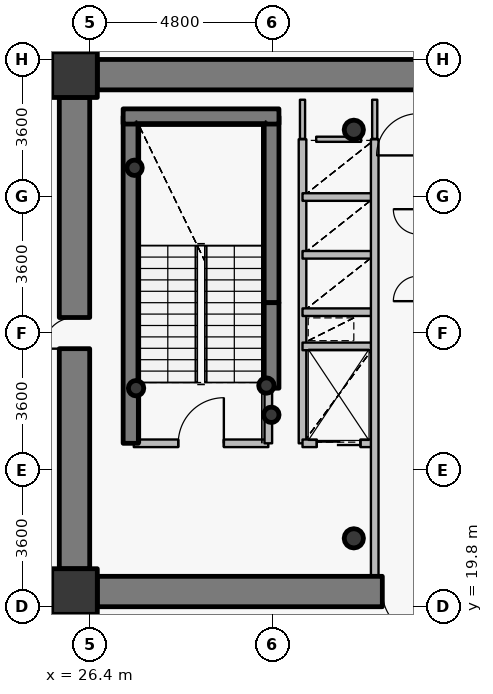
"""IFC4 building model, lengths in metres.
Left out: names, types, materials, properties, quantities, classifications, styles, units other than length and angle.
Written with IfcOpenShell. Run it as: python <this file> out.ifc"""

import sys

from ifc_helpers import new_model, si_unit, direction, frame, frame_2d, origin, origin_2d, place, context, subcontext, project, spatial, rectangle, hollow_circle, extrude, source, transform, mapped, element, fill, save


model = new_model("IFC4")
c1 = context("Model", 3, precision=1e-05, world=origin(), true_north=direction((0.0, 1.0)))
c2 = subcontext(c1, "Body", "Model", "MODEL_VIEW")
j1 = project(units=[si_unit("LENGTHUNIT", "METRE"), si_unit("PLANEANGLEUNIT", "RADIAN")], contexts=[c1])
p1 = place(None, origin())
s1 = spatial("IfcSite", under=j1, at=p1, CompositionType="ELEMENT")
p2 = place(p1, origin())
s2 = spatial("IfcBuilding", under=s1, at=p2, CompositionType="ELEMENT")
p3 = place(p2, frame((0.0, 0.0, 112.2)))
s3 = spatial("IfcBuildingStorey", under=s2, at=p3, CompositionType="ELEMENT", Elevation=112.2)
for number, where, z_axis, x_axis in (
    (1, (26.0, 20.2, 0.0), (0.0, 0.0, 1.0), (1.0, 0.0, 0.0)),
    (2, (26.0, 33.8, 0.0), (0.0, 0.0, 1.0), (1.0, 0.0, 0.0)),
):
    element("IfcColumn", number, at=place(p3, frame(where, z_axis=z_axis, x_axis=x_axis)), inside=s3, PredefinedType="COLUMN", context=c2, shape_type="SweptSolid", body=[
        extrude(rectangle(XDim=1.2, YDim=1.2, at=origin_2d()), origin(), (0.0, 0.0, 1.0), 3.75),
    ])
for number, where, z_axis, x_axis in (
    (3, (33.35, 21.6, 0.0), (0.0, 0.0, 1.0), (1.0, 0.0, 0.0)),
    (4, (33.35, 32.35, 0.0), (0.0, 0.0, 1.0), (1.0, 0.0, 0.0)),
):
    element("IfcColumn", number, at=place(p3, frame(where, z_axis=z_axis, x_axis=x_axis)), inside=s3, PredefinedType="COLUMN", context=c2, shape_type="SweptSolid", body=[
        extrude(hollow_circle(Radius=0.254, WallThickness=0.02, at=origin_2d()), origin(), (0.0, 0.0, 1.0), 3.75),
    ])
p4 = place(p3, frame((27.48, 24.1, 0.0), z_axis=(0.0, 0.0, 1.0), x_axis=(0.0, 1.0, 0.0)))
e5 = element("IfcWall", 5, at=p4, inside=s3, PredefinedType="SHEAR", context=c2, shape_type="SweptSolid", body=[
    extrude(rectangle(XDim=8.6, YDim=0.4, at=frame_2d((4.3, 0.0))), origin(), (0.0, 0.0, 1.0), 3.75),
])
p5 = place(p3, frame((31.18, 27.8, 0.0), z_axis=(0.0, 0.0, 1.0), x_axis=(0.0, 1.0, 0.0)))
e6 = element("IfcWall", 6, at=p5, inside=s3, PredefinedType="SHEAR", context=c2, shape_type="SweptSolid", body=[
    extrude(rectangle(XDim=4.9, YDim=0.4, at=frame_2d((2.45, 0.0))), origin(), (0.0, 0.0, 1.0), 3.75),
])
p6 = place(p3, frame((27.28, 32.7, 0.0), z_axis=(0.0, 0.0, 1.0), x_axis=(1.0, 0.0, 0.0)))
e7 = element("IfcWall", 7, at=p6, inside=s3, PredefinedType="SHEAR", context=c2, shape_type="SweptSolid", body=[
    extrude(rectangle(XDim=4.1, YDim=0.4, at=frame_2d((2.05, 0.0))), origin(), (0.0, 0.0, 1.0), 3.75),
])
for number, where, z_axis, x_axis in (
    (8, (27.58, 31.35, 0.0), (0.0, 0.0, 1.0), (1.0, 0.0, 0.0)),
    (9, (31.05, 25.62, 0.0), (0.0, 0.0, 1.0), (1.0, 0.0, 0.0)),
    (10, (31.18, 24.85, 0.0), (0.0, 0.0, 1.0), (1.0, 0.0, 0.0)),
    (11, (27.62, 25.55, 0.0), (0.0, 0.0, 1.0), (1.0, 0.0, 0.0)),
):
    element("IfcColumn", number, at=place(p3, frame(where, z_axis=z_axis, x_axis=x_axis)), inside=s3, PredefinedType="COLUMN", context=c2, shape_type="SweptSolid", body=[
        extrude(hollow_circle(Radius=0.203, WallThickness=0.016, at=origin_2d()), origin(), (0.0, 0.0, 1.0), 3.75),
    ])
p7 = place(p3, frame((26.6, 33.8, 0.0), z_axis=(0.0, 0.0, 1.0), x_axis=(1.0, 0.0, 0.0)))
e12 = element("IfcWall", 12, at=p7, inside=s3, PredefinedType="SHEAR", context=c2, shape_type="SweptSolid", body=[
    extrude(rectangle(XDim=18.8, YDim=0.8, at=frame_2d((9.4, 0.0))), origin(), (0.0, 0.0, 1.0), 2.95),
])
p8 = place(p3, frame((45.4, 20.2, 0.0), z_axis=(0.0, 0.0, 1.0), x_axis=(-1.0, 0.0, 0.0)))
e13 = element("IfcWall", 13, at=p8, inside=s3, PredefinedType="SHEAR", context=c2, shape_type="SweptSolid", body=[
    extrude(rectangle(XDim=18.8, YDim=0.8, at=frame_2d((9.4, 0.0))), origin(), (0.0, 0.0, 1.0), 2.95),
])
p9 = place(p8, frame((10.15, 0.0, 0.0)))
e14 = element("IfcOpeningElement", 14, at=p9, cuts=e13, PredefinedType="OPENING", context=c2, shape_type="SweptSolid", body=[
    extrude(rectangle(XDim=1.15, YDim=2.15, at=origin_2d()), frame((0.575, 0.41, 1.075), z_axis=(0.0, -1.0, 0.0), x_axis=(1.0, 0.0, 0.0)), (0.0, 0.0, 1.0), 0.82),
])
p10 = place(p3, frame((26.0, 20.8, 0.0), z_axis=(0.0, 0.0, 1.0), x_axis=(0.0, 1.0, 0.0)))
e15 = element("IfcWall", 15, at=p10, inside=s3, PredefinedType="SHEAR", context=c2, shape_type="SweptSolid", body=[
    extrude(rectangle(XDim=12.4, YDim=0.8, at=frame_2d((6.2, 0.0))), origin(), (0.0, 0.0, 1.0), 2.95),
])
p11 = place(p10, frame((5.79, 0.0, 0.0)))
e16 = element("IfcOpeningElement", 16, at=p11, cuts=e15, PredefinedType="OPENING", context=c2, shape_type="SweptSolid", body=[
    extrude(rectangle(XDim=0.82, YDim=2.1, at=origin_2d()), frame((0.41, 0.41, 1.05), z_axis=(0.0, -1.0, 0.0), x_axis=(1.0, 0.0, 0.0)), (0.0, 0.0, 1.0), 0.82),
])
p12 = place(p3, frame((31.18, 25.55, 0.0), z_axis=(0.0, 0.0, 1.0), x_axis=(0.0, 1.0, 0.0)))
e17 = element("IfcWall", 17, at=p12, inside=s3, PredefinedType="SHEAR", context=c2, shape_type="SweptSolid", body=[
    extrude(rectangle(XDim=2.25, YDim=0.4, at=frame_2d((1.125, 0.0))), origin(), (0.0, 0.0, 1.0), 3.1),
])
p13 = place(p3, frame((27.56, 24.1, 0.0), z_axis=(0.0, 0.0, 1.0), x_axis=(1.0, 0.0, 0.0)))
e18 = element("IfcWall", 18, at=p13, inside=s3, PredefinedType="PARTITIONING", context=c2, shape_type="SweptSolid", body=[
    extrude(rectangle(XDim=3.54, YDim=0.2, at=frame_2d((1.77, 0.0))), origin(), (0.0, 0.0, 1.0), 3.5),
])
p14 = place(p13, frame((1.17, 0.0, 0.0)))
e19 = element("IfcOpeningElement", 19, at=p14, cuts=e18, PredefinedType="OPENING", context=c2, shape_type="SweptSolid", body=[
    extrude(rectangle(XDim=1.2, YDim=2.15, at=origin_2d()), frame((0.6, 0.11, 1.075), z_axis=(0.0, -1.0, 0.0), x_axis=(1.0, 0.0, 0.0)), (0.0, 0.0, 1.0), 0.22),
])
p15 = place(p3, frame((31.1, 24.1, 0.0), z_axis=(0.0, 0.0, 1.0), x_axis=(0.0, 1.0, 0.0)))
e20 = element("IfcWall", 20, at=p15, inside=s3, PredefinedType="PARTITIONING", context=c2, shape_type="SweptSolid", body=[
    extrude(rectangle(XDim=1.44, YDim=0.2, at=frame_2d((0.72, 0.0))), origin(), (0.0, 0.0, 1.0), 3.5),
])
p16 = place(p3, frame((32.0, 24.1, 0.0), z_axis=(0.0, 0.0, 1.0), x_axis=(0.0, 1.0, 0.0)))
e21 = element("IfcWall", 21, at=p16, inside=s3, PredefinedType="PARTITIONING", context=c2, shape_type="SweptSolid", body=[
    extrude(rectangle(XDim=8.0, YDim=0.2, at=frame_2d((4.0, 0.0))), origin(), (0.0, 0.0, 1.0), 3.5),
])
p17 = place(p3, frame((32.0, 24.1, 0.0), z_axis=(0.0, 0.0, 1.0), x_axis=(1.0, 0.0, 0.0)))
e22 = element("IfcWall", 22, at=p17, inside=s3, PredefinedType="PARTITIONING", context=c2, shape_type="SweptSolid", body=[
    extrude(rectangle(XDim=1.9, YDim=0.2, at=frame_2d((0.95, 0.0))), origin(), (0.0, 0.0, 1.0), 3.085),
])
p18 = place(p17, frame((0.375, 0.0, 0.0)))
e23 = element("IfcOpeningElement", 23, at=p18, cuts=e22, PredefinedType="OPENING", context=c2, shape_type="SweptSolid", body=[
    extrude(rectangle(XDim=1.15, YDim=2.15, at=origin_2d()), frame((0.575, 0.11, 1.075), z_axis=(0.0, -1.0, 0.0), x_axis=(1.0, 0.0, 0.0)), (0.0, 0.0, 1.0), 0.22),
])
for number, where, z_axis, x_axis in (
    (24, (32.0, 26.65, 0.0), (0.0, 0.0, 1.0), (1.0, 0.0, 0.0)),
    (25, (32.0, 27.55, 0.0), (0.0, 0.0, 1.0), (1.0, 0.0, 0.0)),
    (26, (32.0, 29.06, 0.0), (0.0, 0.0, 1.0), (1.0, 0.0, 0.0)),
    (27, (32.0, 30.58, 0.0), (0.0, 0.0, 1.0), (1.0, 0.0, 0.0)),
):
    element("IfcWall", number, at=place(p3, frame(where, z_axis=z_axis, x_axis=x_axis)), inside=s3, PredefinedType="PARTITIONING", context=c2, shape_type="SweptSolid", body=[
        extrude(rectangle(XDim=1.9, YDim=0.2, at=frame_2d((0.95, 0.0))), origin(), (0.0, 0.0, 1.0), 3.085),
    ])
p19 = place(p3, frame((33.9, 20.6, 0.0), z_axis=(0.0, 0.0, 1.0), x_axis=(0.0, 1.0, 0.0)))
e28 = element("IfcWall", 28, at=p19, inside=s3, PredefinedType="PARTITIONING", context=c2, shape_type="SweptSolid", body=[
    extrude(rectangle(XDim=11.5, YDim=0.2, at=frame_2d((5.75, 0.0))), origin(), (0.0, 0.0, 1.0), 3.085),
])
p20 = place(p3, frame((32.36, 32.1, 0.0), z_axis=(0.0, 0.0, 1.0), x_axis=(1.0, 0.0, 0.0)))
e29 = element("IfcWall", 29, at=p20, inside=s3, PredefinedType="PARTITIONING", context=c2, shape_type="SweptSolid", body=[
    extrude(rectangle(XDim=1.18, YDim=0.135, at=frame_2d((0.59, 0.0))), origin(), (0.0, 0.0, 1.0), 3.085),
])
p21 = place(p3, frame((32.0, 33.14, 0.0), z_axis=(0.0, 0.0, 1.0), x_axis=(0.0, -1.0, 0.0)))
e30 = element("IfcWall", 30, at=p21, inside=s3, PredefinedType="PARTITIONING", context=c2, shape_type="SweptSolid", body=[
    extrude(rectangle(XDim=1.03, YDim=0.135, at=frame_2d((0.515, 0.0))), origin(), (0.0, 0.0, 1.0), 3.035),
])
p22 = place(p3, frame((33.9, 32.11, 0.0), z_axis=(0.0, 0.0, 1.0), x_axis=(0.0, 1.0, 0.0)))
e31 = element("IfcWall", 31, at=p22, inside=s3, PredefinedType="PARTITIONING", context=c2, shape_type="SweptSolid", body=[
    extrude(rectangle(XDim=1.03, YDim=0.135, at=frame_2d((0.515, 0.0))), origin(), (0.0, 0.0, 1.0), 3.085),
])
p23 = place(p3, frame((26.59, 34.2, 0.0), z_axis=(0.0, 0.0, 1.0), x_axis=(-1.0, 0.0, 0.0)))
e32 = element("IfcWall", 32, at=p23, inside=s3, PredefinedType="PARTITIONING", context=c2, shape_type="SweptSolid", body=[
    extrude(rectangle(XDim=0.99, YDim=0.135, at=frame_2d((0.495, 0.0))), origin(), (0.0, 0.0, 1.0), 2.935),
])
p24 = place(p3, frame((25.6, 33.893, 0.0), z_axis=(0.0, 0.0, 1.0), x_axis=(0.0, -1.0, 0.0)))
e33 = element("IfcWall", 33, at=p24, inside=s3, PredefinedType="PARTITIONING", context=c2, shape_type="SweptSolid", body=[
    extrude(rectangle(XDim=0.683, YDim=0.135, at=frame_2d((0.341, 0.0))), origin(), (0.0, 0.0, 1.0), 3.5),
])
p25 = place(p3, frame((25.6, 20.79, 0.0), z_axis=(0.0, 0.0, 1.0), x_axis=(0.0, -1.0, 0.0)))
e34 = element("IfcWall", 34, at=p25, inside=s3, PredefinedType="PARTITIONING", context=c2, shape_type="SweptSolid", body=[
    extrude(rectangle(XDim=0.99, YDim=0.135, at=frame_2d((0.495, 0.0))), origin(), (0.0, 0.0, 1.0), 3.5),
])
p26 = place(p3, frame((25.907, 19.8, 0.0), z_axis=(0.0, 0.0, 1.0), x_axis=(1.0, 0.0, 0.0)))
e35 = element("IfcWall", 35, at=p26, inside=s3, PredefinedType="PARTITIONING", context=c2, shape_type="SweptSolid", body=[
    extrude(rectangle(XDim=0.683, YDim=0.135, at=frame_2d((0.341, 0.0))), origin(), (0.0, 0.0, 1.0), 2.935),
])
m1 = source(origin(), c2, "Body", "SweptSolid", [
    extrude(rectangle(XDim=0.82, YDim=2.1, at=origin_2d()), frame((0.41, 0.025, 1.05), z_axis=(0.0, -1.0, 0.0), x_axis=(1.0, 0.0, 0.0)), (0.0, 0.0, 1.0), 0.05),
])
p27 = place(p11, origin())
e36 = element("IfcDoor", 36, at=p27, inside=s3, OperationType="SINGLE_SWING_LEFT", PredefinedType="DOOR", context=c2, shape_type="MappedRepresentation", body=[
    mapped(m1, transform((0.0, 0.0, 0.0), x_axis=(1.0, 0.0, 0.0), y_axis=(0.0, 1.0, 0.0), z_axis=(0.0, 0.0, 1.0), scale=1.0)),
])
fill(e16, e36)
m2 = source(origin(), c2, "Body", "SweptSolid", [
    extrude(rectangle(XDim=1.15, YDim=2.15, at=origin_2d()), frame((0.575, 0.025, 1.075), z_axis=(0.0, -1.0, 0.0), x_axis=(1.0, 0.0, 0.0)), (0.0, 0.0, 1.0), 0.05),
])
p28 = place(p9, origin())
e37 = element("IfcDoor", 37, at=p28, inside=s3, OperationType="SINGLE_SWING_LEFT", PredefinedType="DOOR", context=c2, shape_type="MappedRepresentation", body=[
    mapped(m2, transform((0.0, 0.0, 0.0), x_axis=(1.0, 0.0, 0.0), y_axis=(0.0, 1.0, 0.0), z_axis=(0.0, 0.0, 1.0), scale=1.0)),
])
fill(e14, e37)
m3 = source(origin(), c2, "Body", "SweptSolid", [
    extrude(rectangle(XDim=1.2, YDim=2.15, at=origin_2d()), frame((0.6, 0.025, 1.075), z_axis=(0.0, -1.0, 0.0), x_axis=(1.0, 0.0, 0.0)), (0.0, 0.0, 1.0), 0.05),
])
p29 = place(p14, origin())
e38 = element("IfcDoor", 38, at=p29, inside=s3, OperationType="SINGLE_SWING_RIGHT", PredefinedType="DOOR", context=c2, shape_type="MappedRepresentation", body=[
    mapped(m3, transform((0.0, 0.0, 0.0), x_axis=(1.0, 0.0, 0.0), y_axis=(0.0, 1.0, 0.0), z_axis=(0.0, 0.0, 1.0), scale=1.0)),
])
fill(e19, e38)
m4 = source(origin(), c2, "Body", "SweptSolid", [
    extrude(rectangle(XDim=1.15, YDim=2.15, at=origin_2d()), frame((0.575, 0.025, 1.075), z_axis=(0.0, -1.0, 0.0), x_axis=(1.0, 0.0, 0.0)), (0.0, 0.0, 1.0), 0.05),
])
p30 = place(p18, origin())
e39 = element("IfcDoor", 39, at=p30, inside=s3, OperationType="DOUBLE_DOOR_SLIDING", PredefinedType="USERDEFINED", context=c2, shape_type="MappedRepresentation", body=[
    mapped(m4, transform((0.0, 0.0, 0.0), x_axis=(1.0, 0.0, 0.0), y_axis=(0.0, 1.0, 0.0), z_axis=(0.0, 0.0, 1.0), scale=1.0)),
])
fill(e23, e39)
save(model, sys.argv[1])
